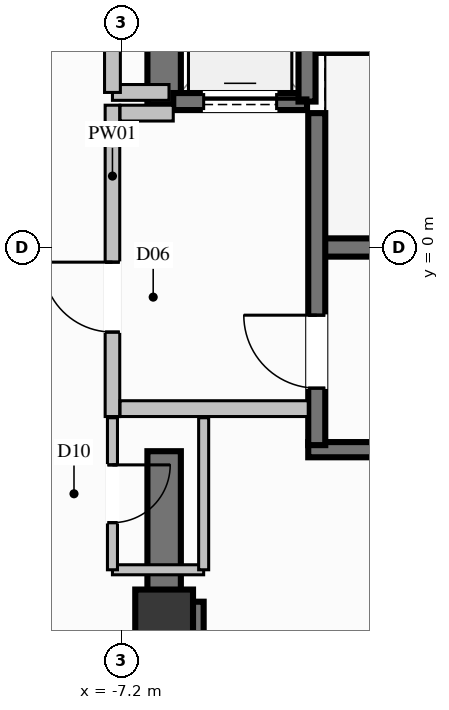
"""IFC4 building model, lengths in metres.
Left out: names, types, materials, properties, quantities, classifications, styles, units other than length and angle.
Written with IfcOpenShell. Run it as: python <this file> out.ifc"""

import sys

from ifc_helpers import new_model, si_unit, direction, frame, frame_2d, origin, origin_2d, place, context, subcontext, project, spatial, rectangle, extrude, element, fill, save


model = new_model("IFC4")
c1 = context("Model", 3, precision=1e-05, world=origin(), true_north=direction((0.0, 1.0)))
c2 = subcontext(c1, "Body", "Model", "MODEL_VIEW")
j1 = project(units=[si_unit("LENGTHUNIT", "METRE"), si_unit("PLANEANGLEUNIT", "RADIAN")], contexts=[c1])
p1 = place(None, origin())
s1 = spatial("IfcSite", under=j1, at=p1, CompositionType="ELEMENT")
p2 = place(p1, origin())
s2 = spatial("IfcBuilding", under=s1, at=p2, CompositionType="ELEMENT")
p3 = place(p2, frame((0.0, 0.0, 198.4)))
s3 = spatial("IfcBuildingStorey", under=s2, at=p3, CompositionType="ELEMENT", Elevation=198.4)
p4 = place(p3, frame((-6.5, -6.1, 0.0), z_axis=(0.0, 0.0, 1.0), x_axis=(1.0, 0.0, 0.0)))
e1 = element("IfcColumn", 1, at=p4, inside=s3, PredefinedType="COLUMN", context=c2, shape_type="SweptSolid", body=[
    extrude(rectangle(XDim=0.95, YDim=0.95, at=origin_2d()), origin(), (0.0, 0.0, 1.0), 3.6),
])
p5 = place(p3, frame((-3.99, 0.0, 0.0), z_axis=(0.0, 0.0, 1.0), x_axis=(1.0, 0.0, 0.0)))
e2 = element("IfcWall", 2, at=p5, inside=s3, PredefinedType="SHEAR", context=c2, shape_type="SweptSolid", body=[
    extrude(rectangle(XDim=7.98, YDim=0.3, at=frame_2d((3.99, 0.0))), origin(), (0.0, 0.0, 1.0), 3.6),
])
for number, where, z_axis, x_axis in (
    (3, (-4.13, -3.325, 0.0), (0.0, 0.0, 1.0), (1.0, 0.0, 0.0)),
    (4, (-4.13, 3.325, 0.0), (0.0, 0.0, 1.0), (1.0, 0.0, 0.0)),
):
    element("IfcWall", number, at=place(p3, frame(where, z_axis=z_axis, x_axis=x_axis)), inside=s3, PredefinedType="SOLIDWALL", context=c2, shape_type="SweptSolid", body=[
        extrude(rectangle(XDim=8.26, YDim=0.25, at=frame_2d((4.13, 0.0))), origin(), (0.0, 0.0, 1.0), 3.6),
    ])
p6 = place(p3, frame((-6.225, -6.1, 0.0), z_axis=(0.0, 0.0, 1.0), x_axis=(1.0, 0.0, 0.0)))
e5 = element("IfcWall", 5, at=p6, inside=s3, PredefinedType="SHEAR", context=c2, shape_type="SweptSolid", body=[
    extrude(rectangle(XDim=0.375, YDim=0.55, at=frame_2d((0.188, 0.0))), origin(), (0.0, 0.0, 1.0), 3.6),
])
p7 = place(p3, frame((-6.5, 2.35, 0.0), z_axis=(0.0, 0.0, 1.0), x_axis=(0.0, 1.0, 0.0)))
e6 = element("IfcWall", 6, at=p7, inside=s3, PredefinedType="SHEAR", context=c2, shape_type="SweptSolid", body=[
    extrude(rectangle(XDim=4.025, YDim=0.55, at=frame_2d((2.012, 0.0))), origin(), (0.0, 0.0, 1.0), 3.6),
])
p8 = place(p3, frame((-6.5, -6.375, 0.0), z_axis=(0.0, 0.0, 1.0), x_axis=(0.0, 1.0, 0.0)))
e7 = element("IfcWall", 7, at=p8, inside=s3, PredefinedType="SHEAR", context=c2, shape_type="SweptSolid", body=[
    extrude(rectangle(XDim=3.025, YDim=0.55, at=frame_2d((1.512, 0.0))), origin(), (0.0, 0.0, 1.0), 3.6),
])
p9 = place(p3, frame((-6.35, 2.4, 0.0), z_axis=(0.0, 0.0, 1.0), x_axis=(1.0, 0.0, 0.0)))
e8 = element("IfcWall", 8, at=p9, inside=s3, PredefinedType="SOLIDWALL", context=c2, shape_type="SweptSolid", body=[
    extrude(rectangle(XDim=2.2, YDim=0.28, at=frame_2d((1.1, 0.0))), origin(), (0.0, 0.0, 1.0), 3.36),
])
p10 = place(p9, frame((0.5, 0.0, 0.0)))
e9 = element("IfcOpeningElement", 9, at=p10, cuts=e8, PredefinedType="OPENING", context=c2, shape_type="SweptSolid", body=[
    extrude(rectangle(XDim=1.2, YDim=2.2, at=frame_2d((0.6, 1.1))), frame((0.0, 0.15, 0.0), z_axis=(0.0, -1.0, 0.0), x_axis=(1.0, 0.0, 0.0)), (0.0, 0.0, 1.0), 0.3),
])
p11 = place(p3, frame((-4.15, 2.4, 0.0), z_axis=(0.0, 0.0, 1.0), x_axis=(0.0, 1.0, 0.0)))
e10 = element("IfcWall", 10, at=p11, inside=s3, PredefinedType="SOLIDWALL", context=c2, shape_type="SweptSolid", body=[
    extrude(rectangle(XDim=2.7, YDim=0.28, at=frame_2d((1.35, 0.0))), origin(), (0.0, 0.0, 1.0), 3.36),
])
p12 = place(p3, frame((-3.99, -3.25, 0.0), z_axis=(0.0, 0.0, 1.0), x_axis=(0.0, 1.0, 0.0)))
e11 = element("IfcWall", 11, at=p12, inside=s3, PredefinedType="SOLIDWALL", context=c2, shape_type="SweptSolid", body=[
    extrude(rectangle(XDim=5.46, YDim=0.28, at=frame_2d((2.73, 0.0))), origin(), (0.0, 0.0, 1.0), 3.36),
])
p13 = place(p12, frame((0.937, 0.0, 0.0)))
e12 = element("IfcOpeningElement", 12, at=p13, cuts=e11, PredefinedType="OPENING", context=c2, shape_type="SweptSolid", body=[
    extrude(rectangle(XDim=1.2, YDim=2.2, at=frame_2d((0.6, 1.1))), frame((0.0, 0.15, 0.0), z_axis=(0.0, -1.0, 0.0), x_axis=(1.0, 0.0, 0.0)), (0.0, 0.0, 1.0), 0.3),
])
p14 = place(p3, frame((-7.35, -2.78, 0.0), z_axis=(0.0, 0.0, 1.0), x_axis=(0.0, 1.0, 0.0)))
e13 = element("IfcWall", 13, at=p14, inside=s3, PredefinedType="PARTITIONING", context=c2, shape_type="SweptSolid", body=[
    extrude(rectangle(XDim=5.12, YDim=0.24, at=frame_2d((2.56, 0.0))), origin(), (0.0, 0.0, 1.0), 2.445),
])
p15 = place(p14, frame((1.389, 0.0, 0.0)))
e14 = element("IfcOpeningElement", 14, at=p15, cuts=e13, PredefinedType="OPENING", context=c2, shape_type="SweptSolid", body=[
    extrude(rectangle(XDim=1.15, YDim=2.2, at=frame_2d((0.575, 1.1))), frame((0.0, 0.13, 0.0), z_axis=(0.0, -1.0, 0.0), x_axis=(1.0, 0.0, 0.0)), (0.0, 0.0, 1.0), 0.26),
])
p16 = place(p3, frame((-7.225, -2.65, 0.0), z_axis=(0.0, 0.0, 1.0), x_axis=(1.0, 0.0, 0.0)))
e15 = element("IfcWall", 15, at=p16, inside=s3, PredefinedType="PARTITIONING", context=c2, shape_type="SweptSolid", body=[
    extrude(rectangle(XDim=3.095, YDim=0.26, at=frame_2d((1.548, 0.0))), origin(), (0.0, 0.0, 1.0), 3.36),
])
p17 = place(p3, frame((-7.225, 2.21, 0.0), z_axis=(0.0, 0.0, 1.0), x_axis=(1.0, 0.0, 0.0)))
e16 = element("IfcWall", 16, at=p17, inside=s3, PredefinedType="PARTITIONING", context=c2, shape_type="SweptSolid", body=[
    extrude(rectangle(XDim=0.875, YDim=0.26, at=frame_2d((0.438, 0.0))), origin(), (0.0, 0.0, 1.0), 3.36),
])
p18 = place(p3, frame((-7.35, 2.55, 0.0), z_axis=(0.0, 0.0, 1.0), x_axis=(1.0, 0.0, 0.0)))
e17 = element("IfcWall", 17, at=p18, inside=s3, PredefinedType="PARTITIONING", context=c2, shape_type="SweptSolid", body=[
    extrude(rectangle(XDim=0.93, YDim=0.26, at=frame_2d((0.465, 0.0))), origin(), (0.0, 0.0, 1.0), 3.36),
])
p19 = place(p3, frame((-7.35, 2.55, 0.0), z_axis=(0.0, 0.0, 1.0), x_axis=(0.0, 1.0, 0.0)))
e18 = element("IfcWall", 18, at=p19, inside=s3, PredefinedType="PARTITIONING", context=c2, shape_type="SweptSolid", body=[
    extrude(rectangle(XDim=2.4, YDim=0.26, at=frame_2d((1.2, 0.0))), origin(), (0.0, 0.0, 1.0), 2.445),
])
p20 = place(p19, frame((0.775, 0.0, 0.0)))
e19 = element("IfcOpeningElement", 19, at=p20, cuts=e18, PredefinedType="OPENING", context=c2, shape_type="SweptSolid", body=[
    extrude(rectangle(XDim=0.85, YDim=2.05, at=frame_2d((0.425, 1.025))), frame((0.0, 0.14, 0.0), z_axis=(0.0, -1.0, 0.0), x_axis=(1.0, 0.0, 0.0)), (0.0, 0.0, 1.0), 0.28),
])
p21 = place(p3, frame((-7.35, -5.3, 0.0), z_axis=(0.0, 0.0, 1.0), x_axis=(1.0, 0.0, 0.0)))
e20 = element("IfcWall", 20, at=p21, inside=s3, PredefinedType="PARTITIONING", context=c2, shape_type="SweptSolid", body=[
    extrude(rectangle(XDim=1.5, YDim=0.165, at=frame_2d((0.75, 0.0))), origin(), (0.0, 0.0, 1.0), 2.445),
])
p22 = place(p3, frame((-5.85, -5.3, 0.0), z_axis=(0.0, 0.0, 1.0), x_axis=(0.0, 1.0, 0.0)))
e21 = element("IfcWall", 21, at=p22, inside=s3, PredefinedType="PARTITIONING", context=c2, shape_type="SweptSolid", body=[
    extrude(rectangle(XDim=2.5, YDim=0.165, at=frame_2d((1.25, 0.0))), origin(), (0.0, 0.0, 1.0), 2.445),
])
p23 = place(p3, frame((-7.35, -2.8, 0.0), z_axis=(0.0, 0.0, 1.0), x_axis=(0.0, -1.0, 0.0)))
e22 = element("IfcWall", 22, at=p23, inside=s3, PredefinedType="PARTITIONING", context=c2, shape_type="SweptSolid", body=[
    extrude(rectangle(XDim=2.5, YDim=0.165, at=frame_2d((1.25, 0.0))), origin(), (0.0, 0.0, 1.0), 3.36),
])
p24 = place(p23, frame((0.775, 0.0, 0.0)))
e23 = element("IfcOpeningElement", 23, at=p24, cuts=e22, PredefinedType="OPENING", context=c2, shape_type="SweptSolid", body=[
    extrude(rectangle(XDim=0.95, YDim=2.1, at=frame_2d((0.475, 1.05))), frame((0.0, 0.093, 0.0), z_axis=(0.0, -1.0, 0.0), x_axis=(1.0, 0.0, 0.0)), (0.0, 0.0, 1.0), 0.185),
])
p25 = place(p10, origin())
e24 = element("IfcDoor", 24, at=p25, inside=s3, OperationType="SLIDING_TO_LEFT", PredefinedType="DOOR", context=c2, shape_type="SweptSolid", body=[
    extrude(rectangle(XDim=1.2, YDim=2.2, at=frame_2d((0.6, 1.1))), frame((0.0, 0.025, 0.0), z_axis=(0.0, -1.0, 0.0), x_axis=(1.0, 0.0, 0.0)), (0.0, 0.0, 1.0), 0.05),
])
fill(e9, e24)
p26 = place(p13, origin())
e25 = element("IfcDoor", 25, at=p26, inside=s3, OperationType="SINGLE_SWING_RIGHT", PredefinedType="DOOR", context=c2, shape_type="SweptSolid", body=[
    extrude(rectangle(XDim=1.2, YDim=2.2, at=frame_2d((0.6, 1.1))), frame((0.0, 0.025, 0.0), z_axis=(0.0, -1.0, 0.0), x_axis=(1.0, 0.0, 0.0)), (0.0, 0.0, 1.0), 0.05),
])
fill(e12, e25)
p27 = place(p15, origin())
e26 = element("IfcDoor", 26, at=p27, inside=s3, OperationType="SINGLE_SWING_RIGHT", PredefinedType="DOOR", context=c2, shape_type="SweptSolid", body=[
    extrude(rectangle(XDim=1.15, YDim=2.2, at=frame_2d((0.575, 1.1))), frame((0.0, 0.025, 0.0), z_axis=(0.0, -1.0, 0.0), x_axis=(1.0, 0.0, 0.0)), (0.0, 0.0, 1.0), 0.05),
])
fill(e14, e26)
p28 = place(p24, origin())
e27 = element("IfcDoor", 27, at=p28, inside=s3, OperationType="SINGLE_SWING_LEFT", PredefinedType="DOOR", context=c2, shape_type="SweptSolid", body=[
    extrude(rectangle(XDim=0.95, YDim=2.1, at=frame_2d((0.475, 1.05))), frame((0.0, 0.025, 0.0), z_axis=(0.0, -1.0, 0.0), x_axis=(1.0, 0.0, 0.0)), (0.0, 0.0, 1.0), 0.05),
])
fill(e23, e27)
save(model, sys.argv[1])
